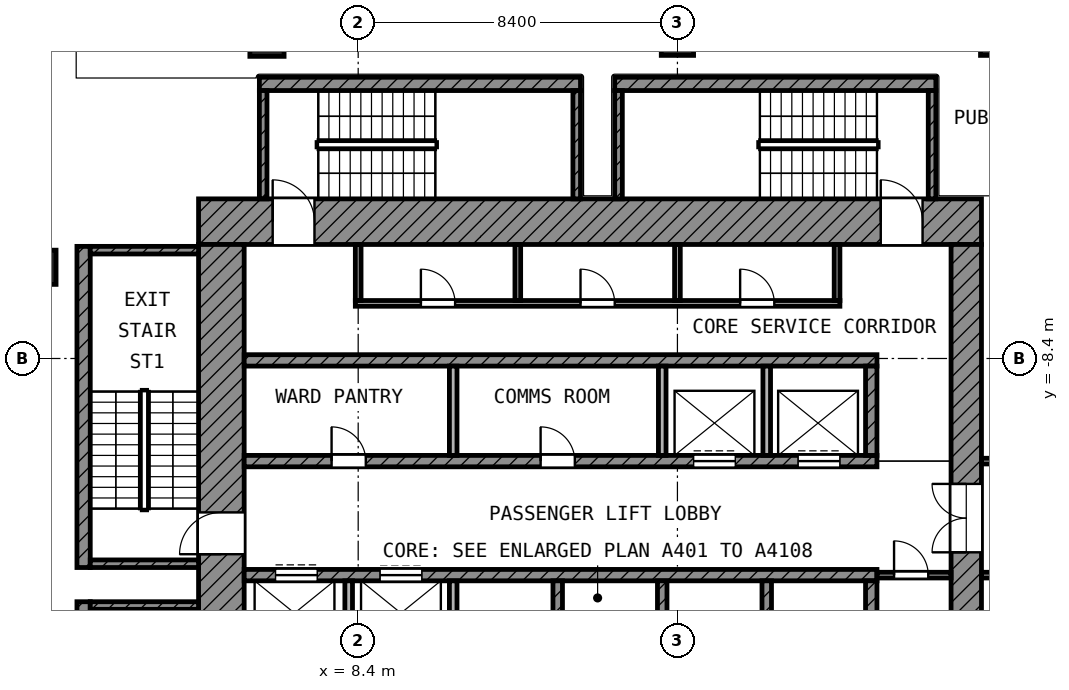
"""IFC4 building model, lengths in metres.
Left out: names, types, materials, properties, quantities, classifications, styles, units other than length and angle.
Written with IfcOpenShell. Run it as: python <this file> out.ifc"""

import sys

from ifc_helpers import new_model, si_unit, direction, frame, frame_2d, origin, origin_2d, place, context, subcontext, project, spatial, rectangle, extrude, element, fill, save


model = new_model("IFC4")
c1 = context("Model", 3, precision=1e-05, world=origin(), true_north=direction((0.0, 1.0)))
c2 = subcontext(c1, "Body", "Model", "MODEL_VIEW")
j1 = project(units=[si_unit("LENGTHUNIT", "METRE"), si_unit("PLANEANGLEUNIT", "RADIAN")], contexts=[c1])
p1 = place(None, origin())
s1 = spatial("IfcSite", under=j1, at=p1, CompositionType="ELEMENT")
p2 = place(p1, origin())
s2 = spatial("IfcBuilding", under=s1, at=p2, CompositionType="ELEMENT")
p3 = place(p2, frame((0.0, 0.0, 251.6)))
s3 = spatial("IfcBuildingStorey", under=s2, at=p3, CompositionType="ELEMENT", Elevation=251.6)
p4 = place(p3, frame((6.0, 0.0, 0.0), z_axis=(0.0, 0.0, 1.0), x_axis=(1.0, 0.0, 0.0)))
e1 = element("IfcColumn", 1, at=p4, inside=s3, PredefinedType="COLUMN", context=c2, shape_type="SweptSolid", body=[
    extrude(rectangle(XDim=0.9, YDim=0.9, at=origin_2d()), origin(), (0.0, 0.0, 1.0), 4.2),
])
for number, where, z_axis, x_axis in (
    (2, (16.8, 0.0, 0.0), (0.0, 0.0, 1.0), (1.0, 0.0, 0.0)),
    (3, (25.2, 0.0, 0.0), (0.0, 0.0, 1.0), (1.0, 0.0, 0.0)),
):
    element("IfcColumn", number, at=place(p3, frame(where, z_axis=z_axis, x_axis=x_axis)), inside=s3, PredefinedType="COLUMN", context=c2, shape_type="SweptSolid", body=[
        extrude(rectangle(XDim=0.85, YDim=0.85, at=origin_2d()), origin(), (0.0, 0.0, 1.0), 4.2),
    ])
p5 = place(p3, frame((0.0, -6.0, 0.0), z_axis=(0.0, 0.0, 1.0), x_axis=(1.0, 0.0, 0.0)))
e4 = element("IfcColumn", 4, at=p5, inside=s3, PredefinedType="COLUMN", context=c2, shape_type="SweptSolid", body=[
    extrude(rectangle(XDim=0.9, YDim=0.9, at=origin_2d()), origin(), (0.0, 0.0, 1.0), 4.2),
])
p6 = place(p3, frame((4.2, -4.8, 0.0), z_axis=(0.0, 0.0, 1.0), x_axis=(1.0, 0.0, 0.0)))
e5 = element("IfcWall", 5, at=p6, inside=s3, PredefinedType="SHEAR", context=c2, shape_type="SweptSolid", body=[
    extrude(rectangle(XDim=20.6, YDim=1.2, at=frame_2d((10.3, 0.0))), origin(), (0.0, 0.0, 1.0), 3.6),
])
p7 = place(p6, frame((1.95, 0.0, 0.0)))
e6 = element("IfcOpeningElement", 6, at=p7, cuts=e5, PredefinedType="OPENING", context=c2, shape_type="SweptSolid", body=[
    extrude(rectangle(XDim=1.1, YDim=2.1, at=frame_2d((0.55, 1.05))), frame((0.0, 0.61, 0.0), z_axis=(0.0, -1.0, 0.0), x_axis=(1.0, 0.0, 0.0)), (0.0, 0.0, 1.0), 1.22),
])
p8 = place(p6, frame((17.95, 0.0, 0.0)))
e7 = element("IfcOpeningElement", 7, at=p8, cuts=e5, PredefinedType="OPENING", context=c2, shape_type="SweptSolid", body=[
    extrude(rectangle(XDim=1.1, YDim=2.1, at=frame_2d((0.55, 1.05))), frame((0.0, 0.61, 0.0), z_axis=(0.0, -1.0, 0.0), x_axis=(1.0, 0.0, 0.0)), (0.0, 0.0, 1.0), 1.22),
])
p9 = place(p3, frame((4.8, -24.8, 0.0), z_axis=(0.0, 0.0, 1.0), x_axis=(0.0, 1.0, 0.0)))
e8 = element("IfcWall", 8, at=p9, inside=s3, PredefinedType="SHEAR", context=c2, shape_type="SweptSolid", body=[
    extrude(rectangle(XDim=19.4, YDim=1.2, at=frame_2d((9.7, 0.0))), origin(), (0.0, 0.0, 1.0), 3.6),
])
p10 = place(p9, frame((11.25, 0.0, 0.0)))
e9 = element("IfcOpeningElement", 9, at=p10, cuts=e8, PredefinedType="OPENING", context=c2, shape_type="SweptSolid", body=[
    extrude(rectangle(XDim=1.1, YDim=2.1, at=frame_2d((0.55, 1.05))), frame((0.0, 0.61, 0.0), z_axis=(0.0, -1.0, 0.0), x_axis=(1.0, 0.0, 0.0)), (0.0, 0.0, 1.0), 1.22),
])
p11 = place(p9, frame((1.95, 0.0, 0.0)))
e10 = element("IfcOpeningElement", 10, at=p11, cuts=e8, PredefinedType="OPENING", context=c2, shape_type="SweptSolid", body=[
    extrude(rectangle(XDim=1.1, YDim=2.1, at=frame_2d((0.55, 1.05))), frame((0.0, 0.61, 0.0), z_axis=(0.0, -1.0, 0.0), x_axis=(1.0, 0.0, 0.0)), (0.0, 0.0, 1.0), 1.22),
])
p12 = place(p3, frame((24.4, -24.0, 0.0), z_axis=(0.0, 0.0, 1.0), x_axis=(0.0, 1.0, 0.0)))
e11 = element("IfcWall", 11, at=p12, inside=s3, PredefinedType="SHEAR", context=c2, shape_type="SweptSolid", body=[
    extrude(rectangle(XDim=18.6, YDim=0.8, at=frame_2d((9.3, 0.0))), origin(), (0.0, 0.0, 1.0), 3.6),
])
p13 = place(p12, frame((10.5, 0.0, 0.0)))
e12 = element("IfcOpeningElement", 12, at=p13, cuts=e11, PredefinedType="OPENING", context=c2, shape_type="SweptSolid", body=[
    extrude(rectangle(XDim=1.8, YDim=2.1, at=frame_2d((0.9, 1.05))), frame((0.0, 0.41, 0.0), z_axis=(0.0, -1.0, 0.0), x_axis=(1.0, 0.0, 0.0)), (0.0, 0.0, 1.0), 0.82),
])
p14 = place(p3, frame((5.4, -8.45, 0.0), z_axis=(0.0, 0.0, 1.0), x_axis=(1.0, 0.0, 0.0)))
e13 = element("IfcWall", 13, at=p14, inside=s3, PredefinedType="SHEAR", context=c2, shape_type="SweptSolid", body=[
    extrude(rectangle(XDim=16.65, YDim=0.3, at=frame_2d((8.325, 0.0))), origin(), (0.0, 0.0, 1.0), 3.6),
])
p15 = place(p3, frame((5.4, -11.1, 0.0), z_axis=(0.0, 0.0, 1.0), x_axis=(1.0, 0.0, 0.0)))
e14 = element("IfcWall", 14, at=p15, inside=s3, PredefinedType="SHEAR", context=c2, shape_type="SweptSolid", body=[
    extrude(rectangle(XDim=16.65, YDim=0.3, at=frame_2d((8.325, 0.0))), origin(), (0.0, 0.0, 1.0), 3.6),
])
p16 = place(p15, frame((11.825, 0.0, 0.0)))
e15 = element("IfcOpeningElement", 15, at=p16, cuts=e14, PredefinedType="OPENING", context=c2, shape_type="SweptSolid", body=[
    extrude(rectangle(XDim=1.1, YDim=2.1, at=frame_2d((0.55, 1.05))), frame((0.0, 0.16, 0.0), z_axis=(0.0, -1.0, 0.0), x_axis=(1.0, 0.0, 0.0)), (0.0, 0.0, 1.0), 0.32),
])
p17 = place(p15, frame((14.575, 0.0, 0.0)))
e16 = element("IfcOpeningElement", 16, at=p17, cuts=e14, PredefinedType="OPENING", context=c2, shape_type="SweptSolid", body=[
    extrude(rectangle(XDim=1.1, YDim=2.1, at=frame_2d((0.55, 1.05))), frame((0.0, 0.16, 0.0), z_axis=(0.0, -1.0, 0.0), x_axis=(1.0, 0.0, 0.0)), (0.0, 0.0, 1.0), 0.32),
])
p18 = place(p15, frame((2.3, 0.0, 0.0)))
e17 = element("IfcOpeningElement", 17, at=p18, cuts=e14, PredefinedType="OPENING", context=c2, shape_type="SweptSolid", body=[
    extrude(rectangle(XDim=0.9, YDim=2.1, at=frame_2d((0.45, 1.05))), frame((0.0, 0.16, 0.0), z_axis=(0.0, -1.0, 0.0), x_axis=(1.0, 0.0, 0.0)), (0.0, 0.0, 1.0), 0.32),
])
p19 = place(p15, frame((7.8, 0.0, 0.0)))
e18 = element("IfcOpeningElement", 18, at=p19, cuts=e14, PredefinedType="OPENING", context=c2, shape_type="SweptSolid", body=[
    extrude(rectangle(XDim=0.9, YDim=2.1, at=frame_2d((0.45, 1.05))), frame((0.0, 0.16, 0.0), z_axis=(0.0, -1.0, 0.0), x_axis=(1.0, 0.0, 0.0)), (0.0, 0.0, 1.0), 0.32),
])
p20 = place(p3, frame((5.4, -14.1, 0.0), z_axis=(0.0, 0.0, 1.0), x_axis=(1.0, 0.0, 0.0)))
e19 = element("IfcWall", 19, at=p20, inside=s3, PredefinedType="SHEAR", context=c2, shape_type="SweptSolid", body=[
    extrude(rectangle(XDim=16.65, YDim=0.3, at=frame_2d((8.325, 0.0))), origin(), (0.0, 0.0, 1.0), 3.6),
])
p21 = place(p20, frame((0.825, 0.0, 0.0)))
e20 = element("IfcOpeningElement", 20, at=p21, cuts=e19, PredefinedType="OPENING", context=c2, shape_type="SweptSolid", body=[
    extrude(rectangle(XDim=1.1, YDim=2.1, at=frame_2d((0.55, 1.05))), frame((0.0, 0.16, 0.0), z_axis=(0.0, -1.0, 0.0), x_axis=(1.0, 0.0, 0.0)), (0.0, 0.0, 1.0), 0.32),
])
p22 = place(p20, frame((3.575, 0.0, 0.0)))
e21 = element("IfcOpeningElement", 21, at=p22, cuts=e19, PredefinedType="OPENING", context=c2, shape_type="SweptSolid", body=[
    extrude(rectangle(XDim=1.1, YDim=2.1, at=frame_2d((0.55, 1.05))), frame((0.0, 0.16, 0.0), z_axis=(0.0, -1.0, 0.0), x_axis=(1.0, 0.0, 0.0)), (0.0, 0.0, 1.0), 0.32),
])
p23 = place(p3, frame((21.9, -10.95, 0.0), z_axis=(0.0, 0.0, 1.0), x_axis=(0.0, 1.0, 0.0)))
e22 = element("IfcWall", 22, at=p23, inside=s3, PredefinedType="SHEAR", context=c2, shape_type="SweptSolid", body=[
    extrude(rectangle(XDim=2.35, YDim=0.3, at=frame_2d((1.175, 0.0))), origin(), (0.0, 0.0, 1.0), 3.6),
])
p24 = place(p3, frame((21.9, -16.6, 0.0), z_axis=(0.0, 0.0, 1.0), x_axis=(0.0, 1.0, 0.0)))
e23 = element("IfcWall", 23, at=p24, inside=s3, PredefinedType="SHEAR", context=c2, shape_type="SweptSolid", body=[
    extrude(rectangle(XDim=2.35, YDim=0.3, at=frame_2d((1.175, 0.0))), origin(), (0.0, 0.0, 1.0), 3.6),
])
for number, where, z_axis, x_axis in (
    (24, (10.9, -10.95, 0.0), (0.0, 0.0, 1.0), (0.0, 1.0, 0.0)),
    (25, (16.4, -10.95, 0.0), (0.0, 0.0, 1.0), (0.0, 1.0, 0.0)),
    (26, (19.15, -10.95, 0.0), (0.0, 0.0, 1.0), (0.0, 1.0, 0.0)),
):
    element("IfcWall", number, at=place(p3, frame(where, z_axis=z_axis, x_axis=x_axis)), inside=s3, PredefinedType="PARTITIONING", context=c2, shape_type="SweptSolid", body=[
        extrude(rectangle(XDim=2.35, YDim=0.2, at=frame_2d((1.175, 0.0))), origin(), (0.0, 0.0, 1.0), 3.6),
    ])
for number, where, z_axis, x_axis in (
    (27, (8.15, -16.6, 0.0), (0.0, 0.0, 1.0), (0.0, 1.0, 0.0)),
    (28, (10.9, -16.6, 0.0), (0.0, 0.0, 1.0), (0.0, 1.0, 0.0)),
):
    element("IfcWall", number, at=place(p3, frame(where, z_axis=z_axis, x_axis=x_axis)), inside=s3, PredefinedType="PARTITIONING", context=c2, shape_type="SweptSolid", body=[
        extrude(rectangle(XDim=2.35, YDim=0.2, at=frame_2d((1.175, 0.0))), origin(), (0.0, 0.0, 1.0), 3.6),
    ])
for number, where, z_axis, x_axis in (
    (29, (13.65, -16.6, 0.0), (0.0, 0.0, 1.0), (0.0, 1.0, 0.0)),
    (30, (16.4, -16.6, 0.0), (0.0, 0.0, 1.0), (0.0, 1.0, 0.0)),
    (31, (19.15, -16.6, 0.0), (0.0, 0.0, 1.0), (0.0, 1.0, 0.0)),
):
    element("IfcWall", number, at=place(p3, frame(where, z_axis=z_axis, x_axis=x_axis)), inside=s3, PredefinedType="SHEAR", context=c2, shape_type="SweptSolid", body=[
        extrude(rectangle(XDim=2.35, YDim=0.25, at=frame_2d((1.175, 0.0))), origin(), (0.0, 0.0, 1.0), 3.6),
    ])
p25 = place(p3, frame((22.05, -14.1, 0.0), z_axis=(0.0, 0.0, 1.0), x_axis=(1.0, 0.0, 0.0)))
e32 = element("IfcWall", 32, at=p25, inside=s3, PredefinedType="PARTITIONING", context=c2, shape_type="SweptSolid", body=[
    extrude(rectangle(XDim=1.95, YDim=0.15, at=frame_2d((0.975, 0.0))), origin(), (0.0, 0.0, 1.0), 3.6),
])
p26 = place(p25, frame((0.45, 0.0, 0.0)))
e33 = element("IfcOpeningElement", 33, at=p26, cuts=e32, PredefinedType="OPENING", context=c2, shape_type="SweptSolid", body=[
    extrude(rectangle(XDim=0.9, YDim=2.1, at=frame_2d((0.45, 1.05))), frame((0.0, 0.085, 0.0), z_axis=(0.0, -1.0, 0.0), x_axis=(1.0, 0.0, 0.0)), (0.0, 0.0, 1.0), 0.17),
])
p27 = place(p3, frame((8.325, -6.95, 0.0), z_axis=(0.0, 0.0, 1.0), x_axis=(1.0, 0.0, 0.0)))
e34 = element("IfcWall", 34, at=p27, inside=s3, PredefinedType="PARTITIONING", context=c2, shape_type="SweptSolid", body=[
    extrude(rectangle(XDim=12.75, YDim=0.15, at=frame_2d((6.375, 0.0))), origin(), (0.0, 0.0, 1.0), 3.6),
])
p28 = place(p27, frame((1.725, 0.0, 0.0)))
e35 = element("IfcOpeningElement", 35, at=p28, cuts=e34, PredefinedType="OPENING", context=c2, shape_type="SweptSolid", body=[
    extrude(rectangle(XDim=0.9, YDim=2.1, at=frame_2d((0.45, 1.05))), frame((0.0, 0.085, 0.0), z_axis=(0.0, -1.0, 0.0), x_axis=(1.0, 0.0, 0.0)), (0.0, 0.0, 1.0), 0.17),
])
p29 = place(p27, frame((5.925, 0.0, 0.0)))
e36 = element("IfcOpeningElement", 36, at=p29, cuts=e34, PredefinedType="OPENING", context=c2, shape_type="SweptSolid", body=[
    extrude(rectangle(XDim=0.9, YDim=2.1, at=frame_2d((0.45, 1.05))), frame((0.0, 0.085, 0.0), z_axis=(0.0, -1.0, 0.0), x_axis=(1.0, 0.0, 0.0)), (0.0, 0.0, 1.0), 0.17),
])
p30 = place(p27, frame((10.125, 0.0, 0.0)))
e37 = element("IfcOpeningElement", 37, at=p30, cuts=e34, PredefinedType="OPENING", context=c2, shape_type="SweptSolid", body=[
    extrude(rectangle(XDim=0.9, YDim=2.1, at=frame_2d((0.45, 1.05))), frame((0.0, 0.085, 0.0), z_axis=(0.0, -1.0, 0.0), x_axis=(1.0, 0.0, 0.0)), (0.0, 0.0, 1.0), 0.17),
])
for number, where, z_axis, x_axis in (
    (38, (8.4, -6.875, 0.0), (0.0, 0.0, 1.0), (0.0, 1.0, 0.0)),
    (39, (12.6, -6.875, 0.0), (0.0, 0.0, 1.0), (0.0, 1.0, 0.0)),
    (40, (16.8, -6.875, 0.0), (0.0, 0.0, 1.0), (0.0, 1.0, 0.0)),
    (41, (21.0, -6.875, 0.0), (0.0, 0.0, 1.0), (0.0, 1.0, 0.0)),
):
    element("IfcWall", number, at=place(p3, frame(where, z_axis=z_axis, x_axis=x_axis)), inside=s3, PredefinedType="PARTITIONING", context=c2, shape_type="SweptSolid", body=[
        extrude(rectangle(XDim=1.475, YDim=0.15, at=frame_2d((0.738, 0.0))), origin(), (0.0, 0.0, 1.0), 3.6),
    ])
p31 = place(p3, frame((1.175, -13.9, 0.0), z_axis=(0.0, 0.0, 1.0), x_axis=(0.0, 1.0, 0.0)))
e42 = element("IfcWall", 42, at=p31, inside=s3, PredefinedType="SHEAR", context=c2, shape_type="SweptSolid", body=[
    extrude(rectangle(XDim=8.45, YDim=0.35, at=frame_2d((4.225, 0.0))), origin(), (0.0, 0.0, 1.0), 3.6),
])
for number, where, z_axis, x_axis in (
    (43, (1.35, -5.55, 0.0), (0.0, 0.0, 1.0), (1.0, 0.0, 0.0)),
    (44, (1.35, -13.8, 0.0), (0.0, 0.0, 1.0), (1.0, 0.0, 0.0)),
):
    element("IfcWall", number, at=place(p3, frame(where, z_axis=z_axis, x_axis=x_axis)), inside=s3, PredefinedType="SHEAR", context=c2, shape_type="SweptSolid", body=[
        extrude(rectangle(XDim=2.85, YDim=0.2, at=frame_2d((1.425, 0.0))), origin(), (0.0, 0.0, 1.0), 3.6),
    ])
p32 = place(p3, frame((1.175, -23.25, 0.0), z_axis=(0.0, 0.0, 1.0), x_axis=(0.0, 1.0, 0.0)))
e45 = element("IfcWall", 45, at=p32, inside=s3, PredefinedType="SHEAR", context=c2, shape_type="SweptSolid", body=[
    extrude(rectangle(XDim=8.45, YDim=0.35, at=frame_2d((4.225, 0.0))), origin(), (0.0, 0.0, 1.0), 3.6),
])
p33 = place(p3, frame((1.35, -14.9, 0.0), z_axis=(0.0, 0.0, 1.0), x_axis=(1.0, 0.0, 0.0)))
e46 = element("IfcWall", 46, at=p33, inside=s3, PredefinedType="SHEAR", context=c2, shape_type="SweptSolid", body=[
    extrude(rectangle(XDim=2.85, YDim=0.2, at=frame_2d((1.425, 0.0))), origin(), (0.0, 0.0, 1.0), 3.6),
])
p34 = place(p3, frame((5.8, -1.175, 0.0), z_axis=(0.0, 0.0, 1.0), x_axis=(1.0, 0.0, 0.0)))
e47 = element("IfcWall", 47, at=p34, inside=s3, PredefinedType="SHEAR", context=c2, shape_type="SweptSolid", body=[
    extrude(rectangle(XDim=8.45, YDim=0.35, at=frame_2d((4.225, 0.0))), origin(), (0.0, 0.0, 1.0), 3.6),
])
for number, where, z_axis, x_axis in (
    (48, (5.9, -4.2, 0.0), (0.0, 0.0, 1.0), (0.0, 1.0, 0.0)),
    (49, (14.15, -4.2, 0.0), (0.0, 0.0, 1.0), (0.0, 1.0, 0.0)),
):
    element("IfcWall", number, at=place(p3, frame(where, z_axis=z_axis, x_axis=x_axis)), inside=s3, PredefinedType="SHEAR", context=c2, shape_type="SweptSolid", body=[
        extrude(rectangle(XDim=2.85, YDim=0.2, at=frame_2d((1.425, 0.0))), origin(), (0.0, 0.0, 1.0), 3.6),
    ])
p35 = place(p3, frame((15.15, -1.175, 0.0), z_axis=(0.0, 0.0, 1.0), x_axis=(1.0, 0.0, 0.0)))
e50 = element("IfcWall", 50, at=p35, inside=s3, PredefinedType="SHEAR", context=c2, shape_type="SweptSolid", body=[
    extrude(rectangle(XDim=8.45, YDim=0.35, at=frame_2d((4.225, 0.0))), origin(), (0.0, 0.0, 1.0), 3.6),
])
for number, where, z_axis, x_axis in (
    (51, (15.25, -4.2, 0.0), (0.0, 0.0, 1.0), (0.0, 1.0, 0.0)),
    (52, (23.5, -4.2, 0.0), (0.0, 0.0, 1.0), (0.0, 1.0, 0.0)),
):
    element("IfcWall", number, at=place(p3, frame(where, z_axis=z_axis, x_axis=x_axis)), inside=s3, PredefinedType="SHEAR", context=c2, shape_type="SweptSolid", body=[
        extrude(rectangle(XDim=2.85, YDim=0.2, at=frame_2d((1.425, 0.0))), origin(), (0.0, 0.0, 1.0), 3.6),
    ])
p36 = place(p3, frame((24.8, -14.1, 0.0), z_axis=(0.0, 0.0, 1.0), x_axis=(1.0, 0.0, 0.0)))
e53 = element("IfcWall", 53, at=p36, inside=s3, PredefinedType="PARTITIONING", context=c2, shape_type="SweptSolid", body=[
    extrude(rectangle(XDim=4.525, YDim=0.15, at=frame_2d((2.262, 0.0))), origin(), (0.0, 0.0, 1.0), 3.6),
])
p37 = place(p36, frame((1.75, 0.0, 0.0)))
e54 = element("IfcOpeningElement", 54, at=p37, cuts=e53, PredefinedType="OPENING", context=c2, shape_type="SweptSolid", body=[
    extrude(rectangle(XDim=1.5, YDim=2.1, at=frame_2d((0.75, 1.05))), frame((0.0, 0.085, 0.0), z_axis=(0.0, -1.0, 0.0), x_axis=(1.0, 0.0, 0.0)), (0.0, 0.0, 1.0), 0.17),
])
p38 = place(p3, frame((24.8, -11.1, 0.0), z_axis=(0.0, 0.0, 1.0), x_axis=(1.0, 0.0, 0.0)))
e55 = element("IfcWall", 55, at=p38, inside=s3, PredefinedType="PARTITIONING", context=c2, shape_type="SweptSolid", body=[
    extrude(rectangle(XDim=4.525, YDim=0.15, at=frame_2d((2.262, 0.0))), origin(), (0.0, 0.0, 1.0), 3.6),
])
p39 = place(p38, frame((1.0, 0.0, 0.0)))
e56 = element("IfcOpeningElement", 56, at=p39, cuts=e55, PredefinedType="OPENING", context=c2, shape_type="SweptSolid", body=[
    extrude(rectangle(XDim=0.9, YDim=2.1, at=frame_2d((0.45, 1.05))), frame((0.0, 0.085, 0.0), z_axis=(0.0, -1.0, 0.0), x_axis=(1.0, 0.0, 0.0)), (0.0, 0.0, 1.0), 0.17),
])
p40 = place(p38, frame((3.05, 0.0, 0.0)))
e57 = element("IfcOpeningElement", 57, at=p40, cuts=e55, PredefinedType="OPENING", context=c2, shape_type="SweptSolid", body=[
    extrude(rectangle(XDim=1.0, YDim=2.1, at=frame_2d((0.5, 1.05))), frame((0.0, 0.085, 0.0), z_axis=(0.0, -1.0, 0.0), x_axis=(1.0, 0.0, 0.0)), (0.0, 0.0, 1.0), 0.17),
])
p41 = place(p16, origin())
e58 = element("IfcDoor", 58, at=p41, inside=s3, OperationType="DOUBLE_DOOR_SLIDING", PredefinedType="DOOR", context=c2, shape_type="SweptSolid", body=[
    extrude(rectangle(XDim=1.1, YDim=2.1, at=frame_2d((0.55, 1.05))), frame((0.0, 0.025, 0.0), z_axis=(0.0, -1.0, 0.0), x_axis=(1.0, 0.0, 0.0)), (0.0, 0.0, 1.0), 0.05),
])
fill(e15, e58)
p42 = place(p17, origin())
e59 = element("IfcDoor", 59, at=p42, inside=s3, OperationType="DOUBLE_DOOR_SLIDING", PredefinedType="DOOR", context=c2, shape_type="SweptSolid", body=[
    extrude(rectangle(XDim=1.1, YDim=2.1, at=frame_2d((0.55, 1.05))), frame((0.0, 0.025, 0.0), z_axis=(0.0, -1.0, 0.0), x_axis=(1.0, 0.0, 0.0)), (0.0, 0.0, 1.0), 0.05),
])
fill(e16, e59)
p43 = place(p21, origin())
e60 = element("IfcDoor", 60, at=p43, inside=s3, OperationType="DOUBLE_DOOR_SLIDING", PredefinedType="DOOR", context=c2, shape_type="SweptSolid", body=[
    extrude(rectangle(XDim=1.1, YDim=2.1, at=frame_2d((0.55, 1.05))), frame((0.0, 0.025, 0.0), z_axis=(0.0, -1.0, 0.0), x_axis=(1.0, 0.0, 0.0)), (0.0, 0.0, 1.0), 0.05),
])
fill(e20, e60)
p44 = place(p22, origin())
e61 = element("IfcDoor", 61, at=p44, inside=s3, OperationType="DOUBLE_DOOR_SLIDING", PredefinedType="DOOR", context=c2, shape_type="SweptSolid", body=[
    extrude(rectangle(XDim=1.1, YDim=2.1, at=frame_2d((0.55, 1.05))), frame((0.0, 0.025, 0.0), z_axis=(0.0, -1.0, 0.0), x_axis=(1.0, 0.0, 0.0)), (0.0, 0.0, 1.0), 0.05),
])
fill(e21, e61)
p45 = place(p10, origin())
e62 = element("IfcDoor", 62, at=p45, inside=s3, OperationType="SINGLE_SWING_LEFT", PredefinedType="DOOR", context=c2, shape_type="SweptSolid", body=[
    extrude(rectangle(XDim=1.1, YDim=2.1, at=frame_2d((0.55, 1.05))), frame((0.0, 0.025, 0.0), z_axis=(0.0, -1.0, 0.0), x_axis=(1.0, 0.0, 0.0)), (0.0, 0.0, 1.0), 0.05),
])
fill(e9, e62)
p46 = place(p7, origin())
e63 = element("IfcDoor", 63, at=p46, inside=s3, OperationType="SINGLE_SWING_LEFT", PredefinedType="DOOR", context=c2, shape_type="SweptSolid", body=[
    extrude(rectangle(XDim=1.1, YDim=2.1, at=frame_2d((0.55, 1.05))), frame((0.0, 0.025, 0.0), z_axis=(0.0, -1.0, 0.0), x_axis=(1.0, 0.0, 0.0)), (0.0, 0.0, 1.0), 0.05),
])
fill(e6, e63)
p47 = place(p8, origin())
e64 = element("IfcDoor", 64, at=p47, inside=s3, OperationType="SINGLE_SWING_LEFT", PredefinedType="DOOR", context=c2, shape_type="SweptSolid", body=[
    extrude(rectangle(XDim=1.1, YDim=2.1, at=frame_2d((0.55, 1.05))), frame((0.0, 0.025, 0.0), z_axis=(0.0, -1.0, 0.0), x_axis=(1.0, 0.0, 0.0)), (0.0, 0.0, 1.0), 0.05),
])
fill(e7, e64)
p48 = place(p13, origin())
e65 = element("IfcDoor", 65, at=p48, inside=s3, OperationType="DOUBLE_DOOR_SINGLE_SWING", PredefinedType="DOOR", context=c2, shape_type="SweptSolid", body=[
    extrude(rectangle(XDim=1.8, YDim=2.1, at=frame_2d((0.9, 1.05))), frame((0.0, 0.025, 0.0), z_axis=(0.0, -1.0, 0.0), x_axis=(1.0, 0.0, 0.0)), (0.0, 0.0, 1.0), 0.05),
])
fill(e12, e65)
p49 = place(p28, origin())
e66 = element("IfcDoor", 66, at=p49, inside=s3, OperationType="SINGLE_SWING_LEFT", PredefinedType="DOOR", context=c2, shape_type="SweptSolid", body=[
    extrude(rectangle(XDim=0.9, YDim=2.1, at=frame_2d((0.45, 1.05))), frame((0.0, 0.025, 0.0), z_axis=(0.0, -1.0, 0.0), x_axis=(1.0, 0.0, 0.0)), (0.0, 0.0, 1.0), 0.05),
])
fill(e35, e66)
p50 = place(p29, origin())
e67 = element("IfcDoor", 67, at=p50, inside=s3, OperationType="SINGLE_SWING_LEFT", PredefinedType="DOOR", context=c2, shape_type="SweptSolid", body=[
    extrude(rectangle(XDim=0.9, YDim=2.1, at=frame_2d((0.45, 1.05))), frame((0.0, 0.025, 0.0), z_axis=(0.0, -1.0, 0.0), x_axis=(1.0, 0.0, 0.0)), (0.0, 0.0, 1.0), 0.05),
])
fill(e36, e67)
p51 = place(p30, origin())
e68 = element("IfcDoor", 68, at=p51, inside=s3, OperationType="SINGLE_SWING_LEFT", PredefinedType="DOOR", context=c2, shape_type="SweptSolid", body=[
    extrude(rectangle(XDim=0.9, YDim=2.1, at=frame_2d((0.45, 1.05))), frame((0.0, 0.025, 0.0), z_axis=(0.0, -1.0, 0.0), x_axis=(1.0, 0.0, 0.0)), (0.0, 0.0, 1.0), 0.05),
])
fill(e37, e68)
p52 = place(p26, origin())
e69 = element("IfcDoor", 69, at=p52, inside=s3, OperationType="SINGLE_SWING_LEFT", PredefinedType="DOOR", context=c2, shape_type="SweptSolid", body=[
    extrude(rectangle(XDim=0.9, YDim=2.1, at=frame_2d((0.45, 1.05))), frame((0.0, 0.025, 0.0), z_axis=(0.0, -1.0, 0.0), x_axis=(1.0, 0.0, 0.0)), (0.0, 0.0, 1.0), 0.05),
])
fill(e33, e69)
p53 = place(p18, origin())
e70 = element("IfcDoor", 70, at=p53, inside=s3, OperationType="SINGLE_SWING_LEFT", PredefinedType="DOOR", context=c2, shape_type="SweptSolid", body=[
    extrude(rectangle(XDim=0.9, YDim=2.1, at=frame_2d((0.45, 1.05))), frame((0.0, 0.025, 0.0), z_axis=(0.0, -1.0, 0.0), x_axis=(1.0, 0.0, 0.0)), (0.0, 0.0, 1.0), 0.05),
])
fill(e17, e70)
p54 = place(p19, origin())
e71 = element("IfcDoor", 71, at=p54, inside=s3, OperationType="SINGLE_SWING_LEFT", PredefinedType="DOOR", context=c2, shape_type="SweptSolid", body=[
    extrude(rectangle(XDim=0.9, YDim=2.1, at=frame_2d((0.45, 1.05))), frame((0.0, 0.025, 0.0), z_axis=(0.0, -1.0, 0.0), x_axis=(1.0, 0.0, 0.0)), (0.0, 0.0, 1.0), 0.05),
])
fill(e18, e71)
save(model, sys.argv[1])
